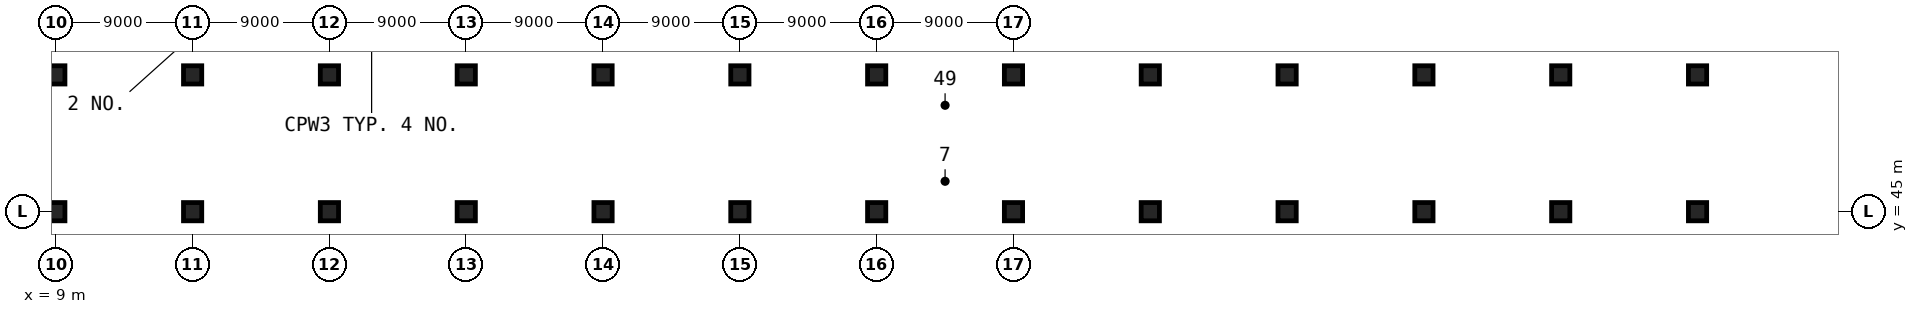
"""IFC4 building model, lengths in metres.
Left out: names, types, materials, properties, quantities, classifications, styles, units other than length and angle.
Written with IfcOpenShell. Run it as: python <this file> out.ifc"""

import sys

from ifc_helpers import new_model, si_unit, direction, frame, origin, origin_2d, place, context, subcontext, project, spatial, rectangle, extrude, element, save


model = new_model("IFC4")
c1 = context("Model", 3, precision=1e-05, world=origin(), true_north=direction((0.0, 1.0)))
c2 = subcontext(c1, "Body", "Model", "MODEL_VIEW")
j1 = project(units=[si_unit("LENGTHUNIT", "METRE"), si_unit("PLANEANGLEUNIT", "RADIAN")], contexts=[c1])
p1 = place(None, origin())
s1 = spatial("IfcSite", under=j1, at=p1, CompositionType="ELEMENT")
p2 = place(p1, origin())
s2 = spatial("IfcBuilding", under=s1, at=p2, CompositionType="ELEMENT")
p3 = place(p2, frame((0.0, 0.0, -4.5)))
s3 = spatial("IfcBuildingStorey", under=s2, at=p3, CompositionType="ELEMENT", Elevation=-4.5)
for number, where, z_axis, x_axis in (
    (1, (9.0, 45.0, 0.0), (0.0, 0.0, 1.0), (1.0, 0.0, 0.0)),
    (2, (9.0, 54.0, 0.0), (0.0, 0.0, 1.0), (1.0, 0.0, 0.0)),
    (3, (18.0, 45.0, 0.0), (0.0, 0.0, 1.0), (1.0, 0.0, 0.0)),
    (4, (18.0, 54.0, 0.0), (0.0, 0.0, 1.0), (1.0, 0.0, 0.0)),
    (5, (27.0, 45.0, 0.0), (0.0, 0.0, 1.0), (1.0, 0.0, 0.0)),
    (6, (27.0, 54.0, 0.0), (0.0, 0.0, 1.0), (1.0, 0.0, 0.0)),
    (7, (36.0, 45.0, 0.0), (0.0, 0.0, 1.0), (1.0, 0.0, 0.0)),
    (8, (36.0, 54.0, 0.0), (0.0, 0.0, 1.0), (1.0, 0.0, 0.0)),
    (9, (45.0, 45.0, 0.0), (0.0, 0.0, 1.0), (1.0, 0.0, 0.0)),
    (10, (45.0, 54.0, 0.0), (0.0, 0.0, 1.0), (1.0, 0.0, 0.0)),
    (11, (54.0, 45.0, 0.0), (0.0, 0.0, 1.0), (1.0, 0.0, 0.0)),
    (12, (54.0, 54.0, 0.0), (0.0, 0.0, 1.0), (1.0, 0.0, 0.0)),
    (13, (63.0, 45.0, 0.0), (0.0, 0.0, 1.0), (1.0, 0.0, 0.0)),
    (14, (63.0, 54.0, 0.0), (0.0, 0.0, 1.0), (1.0, 0.0, 0.0)),
    (15, (72.0, 45.0, 0.0), (0.0, 0.0, 1.0), (1.0, 0.0, 0.0)),
    (16, (72.0, 54.0, 0.0), (0.0, 0.0, 1.0), (1.0, 0.0, 0.0)),
    (17, (81.0, 45.0, 0.0), (0.0, 0.0, 1.0), (1.0, 0.0, 0.0)),
    (18, (81.0, 54.0, 0.0), (0.0, 0.0, 1.0), (1.0, 0.0, 0.0)),
    (19, (90.0, 45.0, 0.0), (0.0, 0.0, 1.0), (1.0, 0.0, 0.0)),
    (20, (90.0, 54.0, 0.0), (0.0, 0.0, 1.0), (1.0, 0.0, 0.0)),
    (21, (99.0, 45.0, 0.0), (0.0, 0.0, 1.0), (1.0, 0.0, 0.0)),
    (22, (99.0, 54.0, 0.0), (0.0, 0.0, 1.0), (1.0, 0.0, 0.0)),
    (23, (108.0, 45.0, 0.0), (0.0, 0.0, 1.0), (1.0, 0.0, 0.0)),
    (24, (108.0, 54.0, 0.0), (0.0, 0.0, 1.0), (1.0, 0.0, 0.0)),
    (25, (117.0, 45.0, 0.0), (0.0, 0.0, 1.0), (1.0, 0.0, 0.0)),
    (26, (117.0, 54.0, 0.0), (0.0, 0.0, 1.0), (1.0, 0.0, 0.0)),
):
    element("IfcColumn", number, at=place(p3, frame(where, z_axis=z_axis, x_axis=x_axis)), inside=s3, PredefinedType="COLUMN", context=c2, shape_type="SweptSolid", body=[
        extrude(rectangle(XDim=1.2, YDim=1.2, at=origin_2d()), origin(), (0.0, 0.0, 1.0), 4.5),
    ])
save(model, sys.argv[1])
